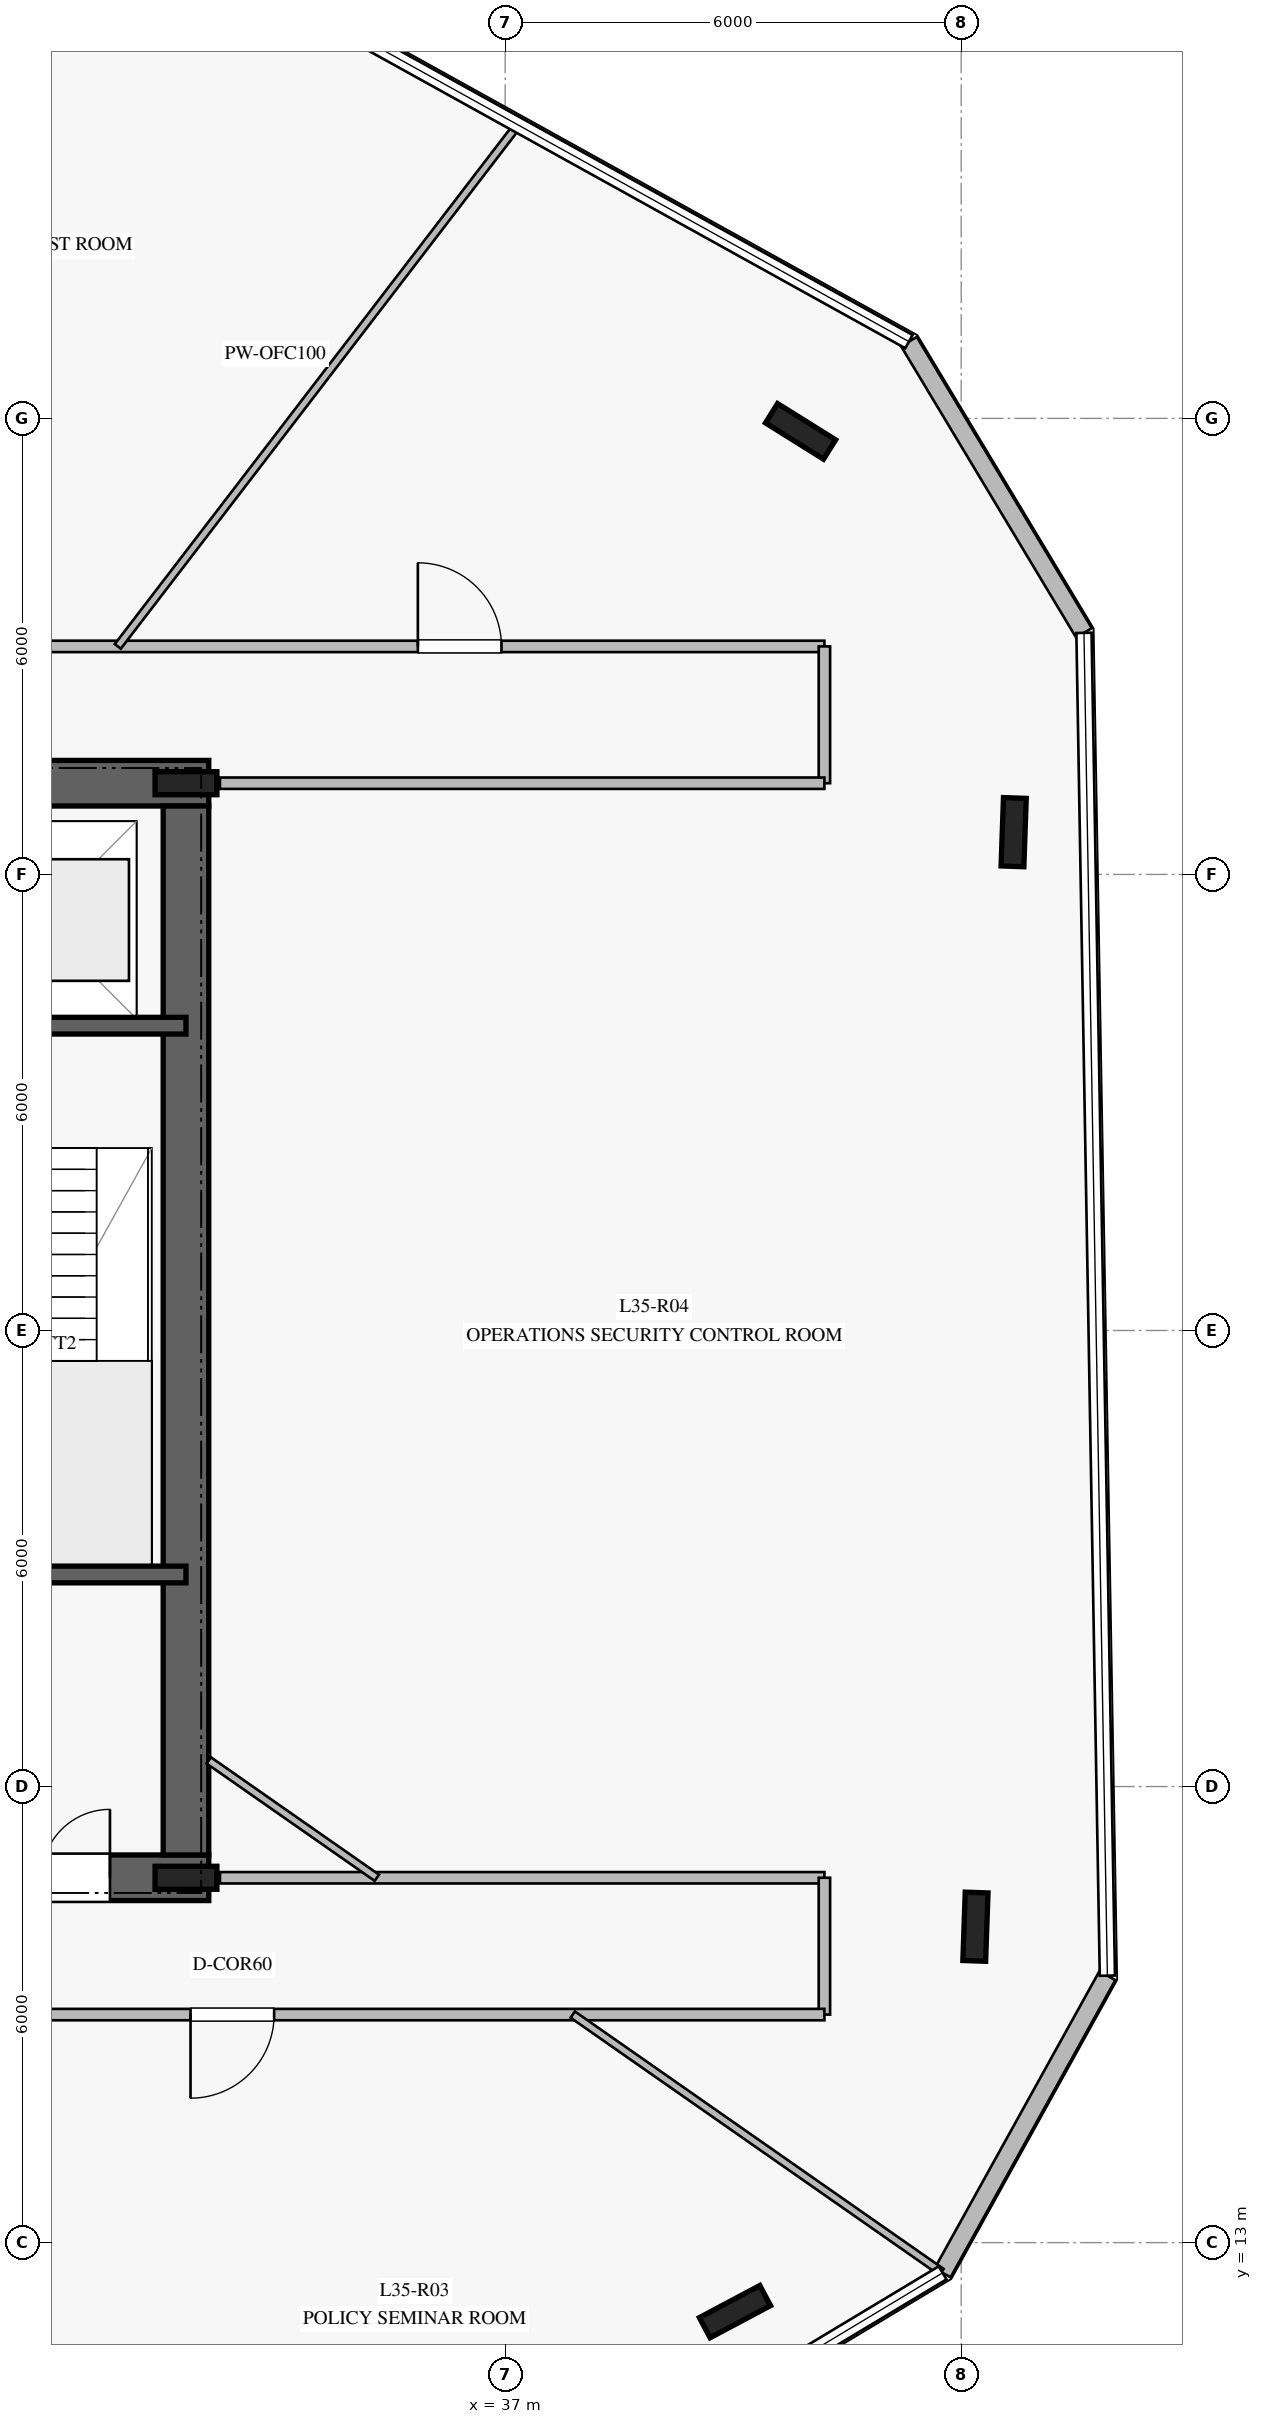
"""IFC4 building model, lengths in metres.
Left out: names, types, materials, properties, quantities, classifications, styles, units other than length and angle.
Written with IfcOpenShell. Run it as: python <this file> out.ifc"""

import sys

from ifc_helpers import new_model, si_unit, direction, frame, frame_2d, origin, origin_2d, place, context, subcontext, project, spatial, rectangle, i_section, extrude, element, fill, save


model = new_model("IFC4")
c1 = context("Model", 3, precision=1e-05, world=origin(), true_north=direction((0.0, 1.0)))
c2 = subcontext(c1, "Body", "Model", "MODEL_VIEW")
j1 = project(units=[si_unit("LENGTHUNIT", "METRE"), si_unit("PLANEANGLEUNIT", "RADIAN")], contexts=[c1])
p1 = place(None, origin())
s1 = spatial("IfcSite", under=j1, at=p1, CompositionType="ELEMENT")
p2 = place(p1, origin())
s2 = spatial("IfcBuilding", under=s1, at=p2, CompositionType="ELEMENT")
p3 = place(p2, frame((0.0, 0.0, 146.4)))
s3 = spatial("IfcBuildingStorey", under=s2, at=p3, CompositionType="ELEMENT", Elevation=146.4)
p4 = place(p3, frame((16.9, 17.8, 0.0), z_axis=(0.0, 0.0, 1.0), x_axis=(1.0, 0.0, 0.0)))
e1 = element("IfcWall", 1, at=p4, inside=s3, PredefinedType="SHEAR", context=c2, shape_type="SweptSolid", body=[
    extrude(rectangle(XDim=16.2, YDim=0.6, at=frame_2d((8.1, 0.0))), origin(), (0.0, 0.0, 1.0), 3.76),
])
p5 = place(p4, frame((5.05, 0.0, 0.0)))
e2 = element("IfcOpeningElement", 2, at=p5, cuts=e1, PredefinedType="OPENING", context=c2, shape_type="SweptSolid", body=[
    extrude(rectangle(XDim=1.2, YDim=2.25, at=frame_2d((0.6, 1.125))), frame((0.0, 0.31, 0.0), z_axis=(0.0, -1.0, 0.0), x_axis=(1.0, 0.0, 0.0)), (0.0, 0.0, 1.0), 0.62),
])
p6 = place(p4, frame((14.0, 0.0, 0.0)))
e3 = element("IfcOpeningElement", 3, at=p6, cuts=e1, PredefinedType="OPENING", context=c2, shape_type="SweptSolid", body=[
    extrude(rectangle(XDim=0.9, YDim=2.1, at=frame_2d((0.45, 1.05))), frame((0.0, 0.31, 0.0), z_axis=(0.0, -1.0, 0.0), x_axis=(1.0, 0.0, 0.0)), (0.0, 0.0, 1.0), 0.62),
])
p7 = place(p4, frame((9.25, 0.0, 0.0)))
e4 = element("IfcOpeningElement", 4, at=p7, cuts=e1, PredefinedType="OPENING", context=c2, shape_type="SweptSolid", body=[
    extrude(rectangle(XDim=1.1, YDim=2.2, at=frame_2d((0.55, 1.1))), frame((0.0, 0.31, 0.0), z_axis=(0.0, -1.0, 0.0), x_axis=(1.0, 0.0, 0.0)), (0.0, 0.0, 1.0), 0.62),
])
p8 = place(p3, frame((33.1, 32.2, 0.0), z_axis=(0.0, 0.0, 1.0), x_axis=(-1.0, 0.0, 0.0)))
e5 = element("IfcWall", 5, at=p8, inside=s3, PredefinedType="SHEAR", context=c2, shape_type="SweptSolid", body=[
    extrude(rectangle(XDim=16.2, YDim=0.6, at=frame_2d((8.1, 0.0))), origin(), (0.0, 0.0, 1.0), 3.76),
])
p9 = place(p8, frame((5.05, 0.0, 0.0)))
e6 = element("IfcOpeningElement", 6, at=p9, cuts=e5, PredefinedType="OPENING", context=c2, shape_type="SweptSolid", body=[
    extrude(rectangle(XDim=1.2, YDim=2.25, at=frame_2d((0.6, 1.125))), frame((0.0, 0.31, 0.0), z_axis=(0.0, -1.0, 0.0), x_axis=(1.0, 0.0, 0.0)), (0.0, 0.0, 1.0), 0.62),
])
p10 = place(p8, frame((11.85, 0.0, 0.0)))
e7 = element("IfcOpeningElement", 7, at=p10, cuts=e5, PredefinedType="OPENING", context=c2, shape_type="SweptSolid", body=[
    extrude(rectangle(XDim=1.1, YDim=2.2, at=frame_2d((0.55, 1.1))), frame((0.0, 0.31, 0.0), z_axis=(0.0, -1.0, 0.0), x_axis=(1.0, 0.0, 0.0)), (0.0, 0.0, 1.0), 0.62),
])
p11 = place(p8, frame((9.875, 0.0, 0.0)))
e8 = element("IfcOpeningElement", 8, at=p11, cuts=e5, PredefinedType="OPENING", context=c2, shape_type="SweptSolid", body=[
    extrude(rectangle(XDim=1.1, YDim=2.2, at=frame_2d((0.55, 1.1))), frame((0.0, 0.31, 0.0), z_axis=(0.0, -1.0, 0.0), x_axis=(1.0, 0.0, 0.0)), (0.0, 0.0, 1.0), 0.62),
])
p12 = place(p8, frame((7.9, 0.0, 0.0)))
e9 = element("IfcOpeningElement", 9, at=p12, cuts=e5, PredefinedType="OPENING", context=c2, shape_type="SweptSolid", body=[
    extrude(rectangle(XDim=1.1, YDim=2.2, at=frame_2d((0.55, 1.1))), frame((0.0, 0.31, 0.0), z_axis=(0.0, -1.0, 0.0), x_axis=(1.0, 0.0, 0.0)), (0.0, 0.0, 1.0), 0.62),
])
p13 = place(p3, frame((32.8, 18.1, 0.0), z_axis=(0.0, 0.0, 1.0), x_axis=(0.0, 1.0, 0.0)))
e10 = element("IfcWall", 10, at=p13, inside=s3, PredefinedType="SHEAR", context=c2, shape_type="SweptSolid", body=[
    extrude(rectangle(XDim=13.8, YDim=0.6, at=frame_2d((6.9, 0.0))), origin(), (0.0, 0.0, 1.0), 3.76),
])
for number, where, z_axis, x_axis in (
    (11, (32.8, 17.8, 0.0), (0.0, 0.0, 1.0), (1.0, 0.0, 0.0)),
    (12, (32.8, 32.2, 0.0), (0.0, 0.0, 1.0), (1.0, 0.0, 0.0)),
):
    element("IfcColumn", number, at=place(p3, frame(where, z_axis=z_axis, x_axis=x_axis)), inside=s3, PredefinedType="COLUMN", context=c2, shape_type="SweptSolid", body=[
        extrude(i_section(OverallWidth=0.303, OverallDepth=0.814, WebThickness=0.021, FlangeThickness=0.04, at=origin_2d()), origin(), (0.0, 0.0, 1.0), 4.0),
    ])
for number, where, z_axis, x_axis in (
    (13, (29.08, 21.79, 0.0), (0.0, 0.0, 1.0), (1.0, 0.0, 0.0)),
    (14, (29.08, 29.01, 0.0), (0.0, 0.0, 1.0), (1.0, 0.0, 0.0)),
):
    element("IfcWall", number, at=place(p3, frame(where, z_axis=z_axis, x_axis=x_axis)), inside=s3, PredefinedType="SOLIDWALL", context=c2, shape_type="SweptSolid", body=[
        extrude(rectangle(XDim=3.72, YDim=0.22, at=frame_2d((1.86, 0.0))), origin(), (0.0, 0.0, 1.0), 3.76),
    ])
for number, where, z_axis, x_axis in (
    (15, (40.886, 36.829, 0.0), (0.0, 0.0, 1.0), (-0.848, 0.53, 0.0)),
    (16, (40.023, 12.092, 0.0), (0.0, 0.0, 1.0), (0.883, 0.469, 0.0)),
    (17, (43.187, 17.156, 0.0), (0.0, 0.0, 1.0), (0.035, 0.999, 0.0)),
    (18, (43.69, 31.556, 0.0), (0.0, 0.0, 1.0), (0.035, 0.999, 0.0)),
):
    element("IfcColumn", number, at=place(p3, frame(where, z_axis=z_axis, x_axis=x_axis)), inside=s3, PredefinedType="COLUMN", context=c2, shape_type="SweptSolid", body=[
        extrude(i_section(OverallWidth=0.3, OverallDepth=0.9, WebThickness=0.019, FlangeThickness=0.035, at=origin_2d()), origin(), (0.0, 0.0, 1.0), 4.0),
    ])
p14 = place(p3, frame((42.755, 12.602, 0.0), z_axis=(0.0, 0.0, 1.0), x_axis=(0.484965863304, 0.874533081953, 0.0)))
e19 = element("IfcWall", 19, at=p14, inside=s3, PredefinedType="STANDARD", context=c2, shape_type="SweptSolid", body=[
    extrude(rectangle(XDim=4.471, YDim=0.24, at=frame_2d((2.235, 0.0))), origin(), (0.0, 0.0, 1.0), 3.76),
])
p15 = place(p3, frame((44.615, 34.178, 0.0), z_axis=(0.0, 0.0, 1.0), x_axis=(-0.515113973, 0.857121691955, 0.0)))
e20 = element("IfcWall", 20, at=p15, inside=s3, PredefinedType="STANDARD", context=c2, shape_type="SweptSolid", body=[
    extrude(rectangle(XDim=4.471, YDim=0.24, at=frame_2d((2.235, 0.0))), origin(), (0.0, 0.0, 1.0), 3.76),
])
p16 = place(p3, frame((25.95, 34.0, 0.0), z_axis=(0.0, 0.0, 1.0), x_axis=(1.0, 0.0, 0.0)))
e21 = element("IfcWall", 21, at=p16, inside=s3, PredefinedType="PARTITIONING", context=c2, shape_type="SweptSolid", body=[
    extrude(rectangle(XDim=15.25, YDim=0.15, at=frame_2d((7.625, 0.0))), origin(), (0.0, 0.0, 1.0), 3.21),
])
p17 = place(p16, frame((9.901, 0.0, 0.0)))
e22 = element("IfcOpeningElement", 22, at=p17, cuts=e21, PredefinedType="OPENING", context=c2, shape_type="SweptSolid", body=[
    extrude(rectangle(XDim=1.1, YDim=2.2, at=frame_2d((0.55, 1.1))), frame((0.0, 0.085, 0.0), z_axis=(0.0, -1.0, 0.0), x_axis=(1.0, 0.0, 0.0)), (0.0, 0.0, 1.0), 0.17),
])
p18 = place(p3, frame((41.2, 34.0, 0.0), z_axis=(0.0, 0.0, 1.0), x_axis=(0.0, -1.0, 0.0)))
e23 = element("IfcWall", 23, at=p18, inside=s3, PredefinedType="PARTITIONING", context=c2, shape_type="SweptSolid", body=[
    extrude(rectangle(XDim=1.8, YDim=0.15, at=frame_2d((0.9, 0.0))), origin(), (0.0, 0.0, 1.0), 3.76),
])
for number, where, z_axis, x_axis in (
    (24, (41.2, 32.2, 0.0), (0.0, 0.0, 1.0), (-1.0, 0.0, 0.0)),
    (25, (33.247, 17.8, 0.0), (0.0, 0.0, 1.0), (1.0, 0.0, 0.0)),
):
    element("IfcWall", number, at=place(p3, frame(where, z_axis=z_axis, x_axis=x_axis)), inside=s3, PredefinedType="PARTITIONING", context=c2, shape_type="SweptSolid", body=[
        extrude(rectangle(XDim=7.953, YDim=0.15, at=frame_2d((3.977, 0.0))), origin(), (0.0, 0.0, 1.0), 3.21),
    ])
p19 = place(p3, frame((41.2, 17.8, 0.0), z_axis=(0.0, 0.0, 1.0), x_axis=(0.0, -1.0, 0.0)))
e26 = element("IfcWall", 26, at=p19, inside=s3, PredefinedType="PARTITIONING", context=c2, shape_type="SweptSolid", body=[
    extrude(rectangle(XDim=1.8, YDim=0.15, at=frame_2d((0.9, 0.0))), origin(), (0.0, 0.0, 1.0), 3.21),
])
p20 = place(p3, frame((41.2, 16.0, 0.0), z_axis=(0.0, 0.0, 1.0), x_axis=(-1.0, 0.0, 0.0)))
e27 = element("IfcWall", 27, at=p20, inside=s3, PredefinedType="PARTITIONING", context=c2, shape_type="SweptSolid", body=[
    extrude(rectangle(XDim=15.25, YDim=0.15, at=frame_2d((7.625, 0.0))), origin(), (0.0, 0.0, 1.0), 3.21),
])
p21 = place(p20, frame((13.114, 0.0, 0.0)))
e28 = element("IfcOpeningElement", 28, at=p21, cuts=e27, PredefinedType="OPENING", context=c2, shape_type="SweptSolid", body=[
    extrude(rectangle(XDim=1.1, YDim=2.2, at=frame_2d((0.55, 1.1))), frame((0.0, 0.085, 0.0), z_axis=(0.0, -1.0, 0.0), x_axis=(1.0, 0.0, 0.0)), (0.0, 0.0, 1.0), 0.17),
])
p22 = place(p20, frame((7.24, 0.0, 0.0)))
e29 = element("IfcOpeningElement", 29, at=p22, cuts=e27, PredefinedType="OPENING", context=c2, shape_type="SweptSolid", body=[
    extrude(rectangle(XDim=1.1, YDim=2.2, at=frame_2d((0.55, 1.1))), frame((0.0, 0.085, 0.0), z_axis=(0.0, -1.0, 0.0), x_axis=(1.0, 0.0, 0.0)), (0.0, 0.0, 1.0), 0.17),
])
p23 = place(p3, frame((31.903, 34.0, 0.0), z_axis=(0.0, 0.0, 1.0), x_axis=(0.608641157294, 0.793445613541, 0.0)))
e30 = element("IfcWall", 30, at=p23, inside=s3, PredefinedType="MOVABLE", context=c2, shape_type="SweptSolid", body=[
    extrude(rectangle(XDim=8.631, YDim=0.1, at=frame_2d((4.315, 0.0))), origin(), (0.0, 0.0, 1.0), 3.02),
])
p24 = place(p3, frame((28.73, 16.0, 0.0), z_axis=(0.0, 0.0, 1.0), x_axis=(0.382840702712, -0.923814373317, 0.0)))
e31 = element("IfcWall", 31, at=p24, inside=s3, PredefinedType="MOVABLE", context=c2, shape_type="SweptSolid", body=[
    extrude(rectangle(XDim=10.231, YDim=0.1, at=frame_2d((5.116, 0.0))), origin(), (0.0, 0.0, 1.0), 3.05),
])
p25 = place(p3, frame((33.1, 19.344, 0.0), z_axis=(0.0, 0.0, 1.0), x_axis=(0.819877899319, -0.572538409374, 0.0)))
e32 = element("IfcWall", 32, at=p25, inside=s3, PredefinedType="MOVABLE", context=c2, shape_type="SweptSolid", body=[
    extrude(rectangle(XDim=2.697, YDim=0.1, at=frame_2d((1.348, 0.0))), origin(), (0.0, 0.0, 1.0), 3.21),
])
p26 = place(p3, frame((37.889, 16.0, 0.0), z_axis=(0.0, 0.0, 1.0), x_axis=(0.819929213153, -0.572464920688, 0.0)))
e33 = element("IfcWall", 33, at=p26, inside=s3, PredefinedType="MOVABLE", context=c2, shape_type="SweptSolid", body=[
    extrude(rectangle(XDim=5.917, YDim=0.1, at=frame_2d((2.958, 0.0))), origin(), (0.0, 0.0, 1.0), 3.16),
])
p27 = place(p6, origin())
e34 = element("IfcDoor", 34, at=p27, inside=s3, OperationType="SINGLE_SWING_RIGHT", PredefinedType="DOOR", context=c2, shape_type="SweptSolid", body=[
    extrude(rectangle(XDim=0.9, YDim=2.1, at=frame_2d((0.45, 1.05))), frame((0.0, 0.025, 0.0), z_axis=(0.0, -1.0, 0.0), x_axis=(1.0, 0.0, 0.0)), (0.0, 0.0, 1.0), 0.05),
])
fill(e3, e34)
p28 = place(p22, origin())
e35 = element("IfcDoor", 35, at=p28, inside=s3, OperationType="SINGLE_SWING_RIGHT", PredefinedType="DOOR", context=c2, shape_type="SweptSolid", body=[
    extrude(rectangle(XDim=1.1, YDim=2.2, at=frame_2d((0.55, 1.1))), frame((0.0, 0.025, 0.0), z_axis=(0.0, -1.0, 0.0), x_axis=(1.0, 0.0, 0.0)), (0.0, 0.0, 1.0), 0.05),
])
fill(e29, e35)
p29 = place(p17, origin())
e36 = element("IfcDoor", 36, at=p29, inside=s3, OperationType="SINGLE_SWING_LEFT", PredefinedType="DOOR", context=c2, shape_type="SweptSolid", body=[
    extrude(rectangle(XDim=1.1, YDim=2.2, at=frame_2d((0.55, 1.1))), frame((0.0, 0.025, 0.0), z_axis=(0.0, -1.0, 0.0), x_axis=(1.0, 0.0, 0.0)), (0.0, 0.0, 1.0), 0.05),
])
fill(e22, e36)
save(model, sys.argv[1])
